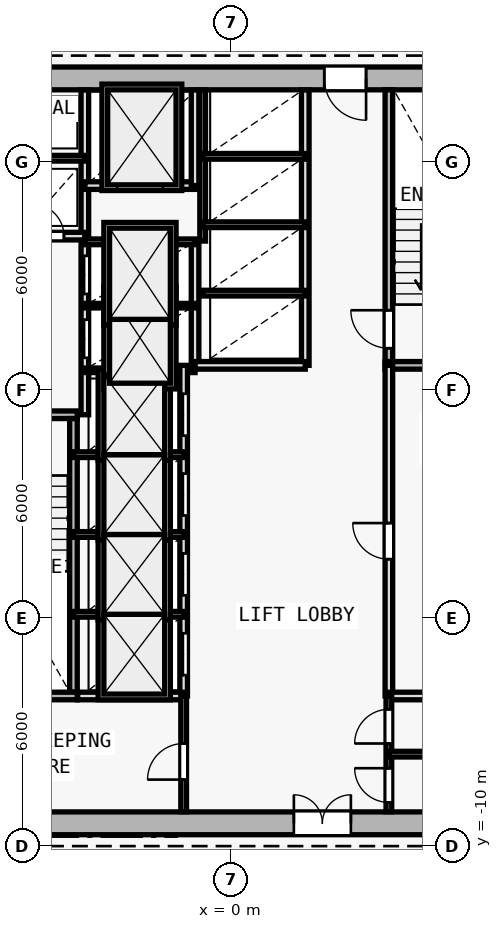
"""IFC4 building model, lengths in metres.
Left out: names, types, materials, properties, quantities, classifications, styles, units other than length and angle.
Written with IfcOpenShell. Run it as: python <this file> out.ifc"""

import sys

from ifc_helpers import new_model, si_unit, direction, frame, frame_2d, origin, origin_2d, place, context, subcontext, project, spatial, rectangle, i_section, extrude, element, fill, save


model = new_model("IFC4")
c1 = context("Model", 3, precision=1e-05, world=origin(), true_north=direction((0.0, 1.0)))
c2 = subcontext(c1, "Body", "Model", "MODEL_VIEW")
j1 = project(units=[si_unit("LENGTHUNIT", "METRE"), si_unit("PLANEANGLEUNIT", "RADIAN")], contexts=[c1])
p1 = place(None, origin())
s1 = spatial("IfcSite", under=j1, at=p1, CompositionType="ELEMENT")
p2 = place(p1, origin())
s2 = spatial("IfcBuilding", under=s1, at=p2, CompositionType="ELEMENT")
p3 = place(p2, frame((0.0, 0.0, 122.1)))
s3 = spatial("IfcBuildingStorey", under=s2, at=p3, CompositionType="ELEMENT", Elevation=122.1)
p4 = place(p3, frame((0.0, -9.4, 0.0), z_axis=(0.0, 0.0, 1.0), x_axis=(1.0, 0.0, 0.0)))
e1 = element("IfcColumn", 1, at=p4, inside=s3, PredefinedType="COLUMN", context=c2, shape_type="SweptSolid", body=[
    extrude(i_section(OverallWidth=0.409, OverallDepth=0.425, WebThickness=0.021, FlangeThickness=0.034, FilletRadius=0.015, at=origin_2d()), origin(), (0.0, 0.0, 1.0), 3.6),
])
p5 = place(p3, frame((-8.0, -9.4, 0.0), z_axis=(0.0, 0.0, 1.0), x_axis=(1.0, 0.0, 0.0)))
e2 = element("IfcWall", 2, at=p5, inside=s3, PredefinedType="SHEAR", context=c2, shape_type="SweptSolid", body=[
    extrude(rectangle(XDim=16.0, YDim=0.6, at=frame_2d((8.0, 0.0))), origin(), (0.0, 0.0, 1.0), 3.35),
])
p6 = place(p5, frame((9.65, 0.0, 0.0)))
e3 = element("IfcOpeningElement", 3, at=p6, cuts=e2, PredefinedType="OPENING", context=c2, shape_type="SweptSolid", body=[
    extrude(rectangle(XDim=1.5, YDim=2.2, at=frame_2d((0.75, 1.1))), frame((0.0, 0.31, 0.0), z_axis=(0.0, -1.0, 0.0), x_axis=(1.0, 0.0, 0.0)), (0.0, 0.0, 1.0), 0.62),
])
p7 = place(p3, frame((8.0, 10.2, 0.0), z_axis=(0.0, 0.0, 1.0), x_axis=(-1.0, 0.0, 0.0)))
e4 = element("IfcWall", 4, at=p7, inside=s3, PredefinedType="SHEAR", context=c2, shape_type="SweptSolid", body=[
    extrude(rectangle(XDim=16.0, YDim=0.6, at=frame_2d((8.0, 0.0))), origin(), (0.0, 0.0, 1.0), 3.35),
])
p8 = place(p7, frame((4.45, 0.0, 0.0)))
e5 = element("IfcOpeningElement", 5, at=p8, cuts=e4, PredefinedType="OPENING", context=c2, shape_type="SweptSolid", body=[
    extrude(rectangle(XDim=1.1, YDim=2.15, at=frame_2d((0.55, 1.075))), frame((0.0, 0.31, 0.0), z_axis=(0.0, -1.0, 0.0), x_axis=(1.0, 0.0, 0.0)), (0.0, 0.0, 1.0), 0.62),
])
p9 = place(p3, frame((-7.4, 1.35, 0.0), z_axis=(0.0, 0.0, 1.0), x_axis=(1.0, 0.0, 0.0)))
e6 = element("IfcWall", 6, at=p9, inside=s3, PredefinedType="SOLIDWALL", context=c2, shape_type="SweptSolid", body=[
    extrude(rectangle(XDim=3.35, YDim=0.2, at=frame_2d((1.675, 0.0))), origin(), (0.0, 0.0, 1.0), 3.35),
])
p10 = place(p9, frame((0.65, 0.0, 0.0)))
e7 = element("IfcOpeningElement", 7, at=p10, cuts=e6, PredefinedType="OPENING", context=c2, shape_type="SweptSolid", body=[
    extrude(rectangle(XDim=1.0, YDim=2.15, at=frame_2d((0.5, 1.075))), frame((0.0, 0.11, 0.0), z_axis=(0.0, -1.0, 0.0), x_axis=(1.0, 0.0, 0.0)), (0.0, 0.0, 1.0), 0.22),
])
p11 = place(p3, frame((-4.15, -5.95, 0.0), z_axis=(0.0, 0.0, 1.0), x_axis=(0.0, 1.0, 0.0)))
e8 = element("IfcWall", 8, at=p11, inside=s3, PredefinedType="SOLIDWALL", context=c2, shape_type="SweptSolid", body=[
    extrude(rectangle(XDim=7.2, YDim=0.2, at=frame_2d((3.6, 0.0))), origin(), (0.0, 0.0, 1.0), 3.35),
])
p12 = place(p3, frame((-3.85, 1.35, 0.0), z_axis=(0.0, 0.0, 1.0), x_axis=(0.0, 1.0, 0.0)))
e9 = element("IfcWall", 9, at=p12, inside=s3, PredefinedType="SOLIDWALL", context=c2, shape_type="SweptSolid", body=[
    extrude(rectangle(XDim=8.545, YDim=0.2, at=frame_2d((4.272, 0.0))), origin(), (0.0, 0.0, 1.0), 3.35),
])
p13 = place(p12, frame((1.5, 0.0, 0.0)))
e10 = element("IfcOpeningElement", 10, at=p13, cuts=e9, PredefinedType="OPENING", context=c2, shape_type="SweptSolid", body=[
    extrude(rectangle(XDim=1.0, YDim=2.15, at=frame_2d((0.5, 1.075))), frame((0.0, 0.11, 0.0), z_axis=(0.0, -1.0, 0.0), x_axis=(1.0, 0.0, 0.0)), (0.0, 0.0, 1.0), 0.22),
])
p14 = place(p12, frame((3.18, 0.0, 0.0)))
e11 = element("IfcOpeningElement", 11, at=p14, cuts=e9, PredefinedType="OPENING", context=c2, shape_type="SweptSolid", body=[
    extrude(rectangle(XDim=1.0, YDim=2.15, at=frame_2d((0.5, 1.075))), frame((0.0, 0.11, 0.0), z_axis=(0.0, -1.0, 0.0), x_axis=(1.0, 0.0, 0.0)), (0.0, 0.0, 1.0), 0.22),
])
p15 = place(p3, frame((-7.395, 6.05, 0.0), z_axis=(0.0, 0.0, 1.0), x_axis=(1.0, 0.0, 0.0)))
e12 = element("IfcWall", 12, at=p15, inside=s3, PredefinedType="SOLIDWALL", context=c2, shape_type="SweptSolid", body=[
    extrude(rectangle(XDim=3.545, YDim=0.2, at=frame_2d((1.772, 0.0))), origin(), (0.0, 0.0, 1.0), 3.35),
])
p16 = place(p15, frame((0.345, 0.0, 0.0)))
e13 = element("IfcOpeningElement", 13, at=p16, cuts=e12, PredefinedType="OPENING", context=c2, shape_type="SweptSolid", body=[
    extrude(rectangle(XDim=0.85, YDim=2.1, at=frame_2d((0.425, 1.05))), frame((0.0, 0.11, 0.0), z_axis=(0.0, -1.0, 0.0), x_axis=(1.0, 0.0, 0.0)), (0.0, 0.0, 1.0), 0.22),
])
p17 = place(p15, frame((2.145, 0.0, 0.0)))
e14 = element("IfcOpeningElement", 14, at=p17, cuts=e12, PredefinedType="OPENING", context=c2, shape_type="SweptSolid", body=[
    extrude(rectangle(XDim=0.85, YDim=2.1, at=frame_2d((0.425, 1.05))), frame((0.0, 0.11, 0.0), z_axis=(0.0, -1.0, 0.0), x_axis=(1.0, 0.0, 0.0)), (0.0, 0.0, 1.0), 0.22),
])
p18 = place(p3, frame((-7.395, 8.1, 0.0), z_axis=(0.0, 0.0, 1.0), x_axis=(1.0, 0.0, 0.0)))
e15 = element("IfcWall", 15, at=p18, inside=s3, PredefinedType="PARTITIONING", context=c2, shape_type="SweptSolid", body=[
    extrude(rectangle(XDim=3.545, YDim=0.15, at=frame_2d((1.772, 0.0))), origin(), (0.0, 0.0, 1.0), 3.35),
])
p19 = place(p3, frame((4.15, 2.75, 0.0), z_axis=(0.0, 0.0, 1.0), x_axis=(0.0, 1.0, 0.0)))
e16 = element("IfcWall", 16, at=p19, inside=s3, PredefinedType="SOLIDWALL", context=c2, shape_type="SweptSolid", body=[
    extrude(rectangle(XDim=7.15, YDim=0.2, at=frame_2d((3.575, 0.0))), origin(), (0.0, 0.0, 1.0), 3.35),
])
p20 = place(p19, frame((0.35, 0.0, 0.0)))
e17 = element("IfcOpeningElement", 17, at=p20, cuts=e16, PredefinedType="OPENING", context=c2, shape_type="SweptSolid", body=[
    extrude(rectangle(XDim=1.0, YDim=2.15, at=frame_2d((0.5, 1.075))), frame((0.0, 0.11, 0.0), z_axis=(0.0, -1.0, 0.0), x_axis=(1.0, 0.0, 0.0)), (0.0, 0.0, 1.0), 0.22),
])
p21 = place(p3, frame((4.05, 2.65, 0.0), z_axis=(0.0, 0.0, 1.0), x_axis=(1.0, 0.0, 0.0)))
e18 = element("IfcWall", 18, at=p21, inside=s3, PredefinedType="SOLIDWALL", context=c2, shape_type="SweptSolid", body=[
    extrude(rectangle(XDim=3.35, YDim=0.2, at=frame_2d((1.675, 0.0))), origin(), (0.0, 0.0, 1.0), 3.35),
])
p22 = place(p3, frame((-0.95, 2.65, 0.0), z_axis=(0.0, 0.0, 1.0), x_axis=(0.0, 1.0, 0.0)))
e19 = element("IfcWall", 19, at=p22, inside=s3, PredefinedType="SOLIDWALL", context=c2, shape_type="SweptSolid", body=[
    extrude(rectangle(XDim=3.27, YDim=0.2, at=frame_2d((1.635, 0.0))), origin(), (0.0, 0.0, 1.0), 3.35),
])
for number, where, z_axis, x_axis in (
    (20, (-3.85, 2.52, 0.0), (0.0, 0.0, 1.0), (1.0, 0.0, 0.0)),
    (21, (-3.85, 4.22, 0.0), (0.0, 0.0, 1.0), (1.0, 0.0, 0.0)),
):
    element("IfcWall", number, at=place(p3, frame(where, z_axis=z_axis, x_axis=x_axis)), inside=s3, PredefinedType="PARTITIONING", context=c2, shape_type="SweptSolid", body=[
        extrude(rectangle(XDim=2.9, YDim=0.12, at=frame_2d((1.45, 0.0))), origin(), (0.0, 0.0, 1.0), 3.35),
    ])
p23 = place(p3, frame((-3.85, 5.9, 0.0), z_axis=(0.0, 0.0, 1.0), x_axis=(1.0, 0.0, 0.0)))
e22 = element("IfcWall", 22, at=p23, inside=s3, PredefinedType="PARTITIONING", context=c2, shape_type="SweptSolid", body=[
    extrude(rectangle(XDim=2.9, YDim=0.15, at=frame_2d((1.45, 0.0))), origin(), (0.0, 0.0, 1.0), 3.35),
])
p24 = place(p3, frame((-3.85, 7.38, 0.0), z_axis=(0.0, 0.0, 1.0), x_axis=(1.0, 0.0, 0.0)))
e23 = element("IfcWall", 23, at=p24, inside=s3, PredefinedType="SOLIDWALL", context=c2, shape_type="SweptSolid", body=[
    extrude(rectangle(XDim=2.9, YDim=0.2, at=frame_2d((1.45, 0.0))), origin(), (0.0, 0.0, 1.0), 3.35),
])
p25 = place(p24, frame((0.85, 0.0, 0.0)))
e24 = element("IfcOpeningElement", 24, at=p25, cuts=e23, PredefinedType="OPENING", context=c2, shape_type="SweptSolid", body=[
    extrude(rectangle(XDim=1.2, YDim=2.2, at=frame_2d((0.6, 1.1))), frame((0.0, 0.11, 0.0), z_axis=(0.0, -1.0, 0.0), x_axis=(1.0, 0.0, 0.0)), (0.0, 0.0, 1.0), 0.22),
])
p26 = place(p3, frame((-0.95, 7.38, 0.0), z_axis=(0.0, 0.0, 1.0), x_axis=(0.0, 1.0, 0.0)))
e25 = element("IfcWall", 25, at=p26, inside=s3, PredefinedType="SOLIDWALL", context=c2, shape_type="SweptSolid", body=[
    extrude(rectangle(XDim=2.515, YDim=0.2, at=frame_2d((1.258, 0.0))), origin(), (0.0, 0.0, 1.0), 3.35),
])
p27 = place(p3, frame((4.15, -6.05, 0.0), z_axis=(0.0, 0.0, 1.0), x_axis=(0.0, 1.0, 0.0)))
e26 = element("IfcWall", 26, at=p27, inside=s3, PredefinedType="SOLIDWALL", context=c2, shape_type="SweptSolid", body=[
    extrude(rectangle(XDim=8.7, YDim=0.2, at=frame_2d((4.35, 0.0))), origin(), (0.0, 0.0, 1.0), 3.35),
])
p28 = place(p27, frame((3.6, 0.0, 0.0)))
e27 = element("IfcOpeningElement", 27, at=p28, cuts=e26, PredefinedType="OPENING", context=c2, shape_type="SweptSolid", body=[
    extrude(rectangle(XDim=0.95, YDim=2.1, at=frame_2d((0.475, 1.05))), frame((0.0, 0.11, 0.0), z_axis=(0.0, -1.0, 0.0), x_axis=(1.0, 0.0, 0.0)), (0.0, 0.0, 1.0), 0.22),
])
p29 = place(p3, frame((-1.25, -6.05, 0.0), z_axis=(0.0, 0.0, 1.0), x_axis=(0.0, 1.0, 0.0)))
e28 = element("IfcWall", 28, at=p29, inside=s3, PredefinedType="SOLIDWALL", context=c2, shape_type="SweptSolid", body=[
    extrude(rectangle(XDim=8.7, YDim=0.2, at=frame_2d((4.35, 0.0))), origin(), (0.0, 0.0, 1.0), 3.35),
])
p30 = place(p29, frame((0.55, 0.0, 0.0)))
e29 = element("IfcOpeningElement", 29, at=p30, cuts=e28, PredefinedType="OPENING", context=c2, shape_type="SweptSolid", body=[
    extrude(rectangle(XDim=1.1, YDim=2.15, at=frame_2d((0.55, 1.075))), frame((0.0, 0.11, 0.0), z_axis=(0.0, -1.0, 0.0), x_axis=(1.0, 0.0, 0.0)), (0.0, 0.0, 1.0), 0.22),
])
p31 = place(p29, frame((2.65, 0.0, 0.0)))
e30 = element("IfcOpeningElement", 30, at=p31, cuts=e28, PredefinedType="OPENING", context=c2, shape_type="SweptSolid", body=[
    extrude(rectangle(XDim=1.1, YDim=2.15, at=frame_2d((0.55, 1.075))), frame((0.0, 0.11, 0.0), z_axis=(0.0, -1.0, 0.0), x_axis=(1.0, 0.0, 0.0)), (0.0, 0.0, 1.0), 0.22),
])
p32 = place(p29, frame((4.75, 0.0, 0.0)))
e31 = element("IfcOpeningElement", 31, at=p32, cuts=e28, PredefinedType="OPENING", context=c2, shape_type="SweptSolid", body=[
    extrude(rectangle(XDim=1.1, YDim=2.15, at=frame_2d((0.55, 1.075))), frame((0.0, 0.11, 0.0), z_axis=(0.0, -1.0, 0.0), x_axis=(1.0, 0.0, 0.0)), (0.0, 0.0, 1.0), 0.22),
])
p33 = place(p29, frame((6.85, 0.0, 0.0)))
e32 = element("IfcOpeningElement", 32, at=p33, cuts=e28, PredefinedType="OPENING", context=c2, shape_type="SweptSolid", body=[
    extrude(rectangle(XDim=1.1, YDim=2.15, at=frame_2d((0.55, 1.075))), frame((0.0, 0.11, 0.0), z_axis=(0.0, -1.0, 0.0), x_axis=(1.0, 0.0, 0.0)), (0.0, 0.0, 1.0), 0.22),
])
for number, where, z_axis, x_axis in (
    (33, (-4.15, -3.9, 0.0), (0.0, 0.0, 1.0), (1.0, 0.0, 0.0)),
    (34, (-4.15, -1.8, 0.0), (0.0, 0.0, 1.0), (1.0, 0.0, 0.0)),
    (35, (-4.15, 0.3, 0.0), (0.0, 0.0, 1.0), (1.0, 0.0, 0.0)),
):
    element("IfcWall", number, at=place(p3, frame(where, z_axis=z_axis, x_axis=x_axis)), inside=s3, PredefinedType="PARTITIONING", context=c2, shape_type="SweptSolid", body=[
        extrude(rectangle(XDim=2.9, YDim=0.15, at=frame_2d((1.45, 0.0))), origin(), (0.0, 0.0, 1.0), 3.35),
    ])
p34 = place(p3, frame((1.95, 2.65, 0.0), z_axis=(0.0, 0.0, 1.0), x_axis=(0.0, 1.0, 0.0)))
e36 = element("IfcWall", 36, at=p34, inside=s3, PredefinedType="SOLIDWALL", context=c2, shape_type="SweptSolid", body=[
    extrude(rectangle(XDim=7.245, YDim=0.2, at=frame_2d((3.623, 0.0))), origin(), (0.0, 0.0, 1.0), 3.35),
])
p35 = place(p3, frame((-0.95, 2.65, 0.0), z_axis=(0.0, 0.0, 1.0), x_axis=(1.0, 0.0, 0.0)))
e37 = element("IfcWall", 37, at=p35, inside=s3, PredefinedType="SOLIDWALL", context=c2, shape_type="SweptSolid", body=[
    extrude(rectangle(XDim=2.9, YDim=0.2, at=frame_2d((1.45, 0.0))), origin(), (0.0, 0.0, 1.0), 3.35),
])
p36 = place(p3, frame((-0.75, 5.92, 0.0), z_axis=(0.0, 0.0, 1.0), x_axis=(0.0, 1.0, 0.0)))
e38 = element("IfcWall", 38, at=p36, inside=s3, PredefinedType="PARTITIONING", context=c2, shape_type="SweptSolid", body=[
    extrude(rectangle(XDim=3.975, YDim=0.15, at=frame_2d((1.988, 0.0))), origin(), (0.0, 0.0, 1.0), 3.35),
])
for number, where, z_axis, x_axis in (
    (39, (-0.75, 4.55, 0.0), (0.0, 0.0, 1.0), (1.0, 0.0, 0.0)),
    (40, (-0.75, 6.35, 0.0), (0.0, 0.0, 1.0), (1.0, 0.0, 0.0)),
    (41, (-0.75, 8.15, 0.0), (0.0, 0.0, 1.0), (1.0, 0.0, 0.0)),
):
    element("IfcWall", number, at=place(p3, frame(where, z_axis=z_axis, x_axis=x_axis)), inside=s3, PredefinedType="PARTITIONING", context=c2, shape_type="SweptSolid", body=[
        extrude(rectangle(XDim=2.7, YDim=0.15, at=frame_2d((1.35, 0.0))), origin(), (0.0, 0.0, 1.0), 3.35),
    ])
p37 = place(p3, frame((-7.4, -6.05, 0.0), z_axis=(0.0, 0.0, 1.0), x_axis=(1.0, 0.0, 0.0)))
e42 = element("IfcWall", 42, at=p37, inside=s3, PredefinedType="SOLIDWALL", context=c2, shape_type="SweptSolid", body=[
    extrude(rectangle(XDim=3.35, YDim=0.2, at=frame_2d((1.675, 0.0))), origin(), (0.0, 0.0, 1.0), 3.35),
])
p38 = place(p3, frame((-4.04, -6.05, 0.0), z_axis=(0.0, 0.0, 1.0), x_axis=(1.0, 0.0, 0.0)))
e43 = element("IfcWall", 43, at=p38, inside=s3, PredefinedType="SOLIDWALL", context=c2, shape_type="SweptSolid", body=[
    extrude(rectangle(XDim=2.79, YDim=0.2, at=frame_2d((1.395, 0.0))), origin(), (0.0, 0.0, 1.0), 3.35),
])
p39 = place(p3, frame((4.15, -6.05, 0.0), z_axis=(0.0, 0.0, 1.0), x_axis=(1.0, 0.0, 0.0)))
e44 = element("IfcWall", 44, at=p39, inside=s3, PredefinedType="SOLIDWALL", context=c2, shape_type="SweptSolid", body=[
    extrude(rectangle(XDim=3.245, YDim=0.2, at=frame_2d((1.623, 0.0))), origin(), (0.0, 0.0, 1.0), 3.35),
])
p40 = place(p3, frame((-1.25, -9.095, 0.0), z_axis=(0.0, 0.0, 1.0), x_axis=(0.0, 1.0, 0.0)))
e45 = element("IfcWall", 45, at=p40, inside=s3, PredefinedType="PARTITIONING", context=c2, shape_type="SweptSolid", body=[
    extrude(rectangle(XDim=3.045, YDim=0.15, at=frame_2d((1.522, 0.0))), origin(), (0.0, 0.0, 1.0), 3.35),
])
p41 = place(p40, frame((0.845, 0.0, 0.0)))
e46 = element("IfcOpeningElement", 46, at=p41, cuts=e45, PredefinedType="OPENING", context=c2, shape_type="SweptSolid", body=[
    extrude(rectangle(XDim=0.95, YDim=2.1, at=frame_2d((0.475, 1.05))), frame((0.0, 0.085, 0.0), z_axis=(0.0, -1.0, 0.0), x_axis=(1.0, 0.0, 0.0)), (0.0, 0.0, 1.0), 0.17),
])
p42 = place(p3, frame((4.15, -9.095, 0.0), z_axis=(0.0, 0.0, 1.0), x_axis=(0.0, 1.0, 0.0)))
e47 = element("IfcWall", 47, at=p42, inside=s3, PredefinedType="PARTITIONING", context=c2, shape_type="SweptSolid", body=[
    extrude(rectangle(XDim=3.045, YDim=0.15, at=frame_2d((1.522, 0.0))), origin(), (0.0, 0.0, 1.0), 3.35),
])
p43 = place(p42, frame((0.245, 0.0, 0.0)))
e48 = element("IfcOpeningElement", 48, at=p43, cuts=e47, PredefinedType="OPENING", context=c2, shape_type="SweptSolid", body=[
    extrude(rectangle(XDim=0.9, YDim=2.1, at=frame_2d((0.45, 1.05))), frame((0.0, 0.085, 0.0), z_axis=(0.0, -1.0, 0.0), x_axis=(1.0, 0.0, 0.0)), (0.0, 0.0, 1.0), 0.17),
])
p44 = place(p42, frame((1.795, 0.0, 0.0)))
e49 = element("IfcOpeningElement", 49, at=p44, cuts=e47, PredefinedType="OPENING", context=c2, shape_type="SweptSolid", body=[
    extrude(rectangle(XDim=0.9, YDim=2.1, at=frame_2d((0.45, 1.05))), frame((0.0, 0.085, 0.0), z_axis=(0.0, -1.0, 0.0), x_axis=(1.0, 0.0, 0.0)), (0.0, 0.0, 1.0), 0.17),
])
p45 = place(p3, frame((4.15, -7.58, 0.0), z_axis=(0.0, 0.0, 1.0), x_axis=(1.0, 0.0, 0.0)))
e50 = element("IfcWall", 50, at=p45, inside=s3, PredefinedType="PARTITIONING", context=c2, shape_type="SweptSolid", body=[
    extrude(rectangle(XDim=3.245, YDim=0.15, at=frame_2d((1.623, 0.0))), origin(), (0.0, 0.0, 1.0), 3.35),
])
p46 = place(p6, origin())
e51 = element("IfcDoor", 51, at=p46, inside=s3, OperationType="DOUBLE_DOOR_SINGLE_SWING", PredefinedType="DOOR", context=c2, shape_type="SweptSolid", body=[
    extrude(rectangle(XDim=1.5, YDim=2.2, at=frame_2d((0.75, 1.1))), frame((0.0, 0.025, 0.0), z_axis=(0.0, -1.0, 0.0), x_axis=(1.0, 0.0, 0.0)), (0.0, 0.0, 1.0), 0.05),
])
fill(e3, e51)
p47 = place(p8, origin())
e52 = element("IfcDoor", 52, at=p47, inside=s3, OperationType="SINGLE_SWING_LEFT", PredefinedType="DOOR", context=c2, shape_type="SweptSolid", body=[
    extrude(rectangle(XDim=1.1, YDim=2.15, at=frame_2d((0.55, 1.075))), frame((0.0, 0.025, 0.0), z_axis=(0.0, -1.0, 0.0), x_axis=(1.0, 0.0, 0.0)), (0.0, 0.0, 1.0), 0.05),
])
fill(e5, e52)
p48 = place(p17, origin())
e53 = element("IfcDoor", 53, at=p48, inside=s3, OperationType="SINGLE_SWING_LEFT", PredefinedType="DOOR", context=c2, shape_type="SweptSolid", body=[
    extrude(rectangle(XDim=0.85, YDim=2.1, at=frame_2d((0.425, 1.05))), frame((0.0, 0.025, 0.0), z_axis=(0.0, -1.0, 0.0), x_axis=(1.0, 0.0, 0.0)), (0.0, 0.0, 1.0), 0.05),
])
fill(e14, e53)
p49 = place(p20, origin())
e54 = element("IfcDoor", 54, at=p49, inside=s3, OperationType="SINGLE_SWING_RIGHT", PredefinedType="DOOR", context=c2, shape_type="SweptSolid", body=[
    extrude(rectangle(XDim=1.0, YDim=2.15, at=frame_2d((0.5, 1.075))), frame((0.0, 0.025, 0.0), z_axis=(0.0, -1.0, 0.0), x_axis=(1.0, 0.0, 0.0)), (0.0, 0.0, 1.0), 0.05),
])
fill(e17, e54)
p50 = place(p25, origin())
e55 = element("IfcDoor", 55, at=p50, inside=s3, OperationType="DOUBLE_DOOR_SLIDING", PredefinedType="DOOR", context=c2, shape_type="SweptSolid", body=[
    extrude(rectangle(XDim=1.2, YDim=2.2, at=frame_2d((0.6, 1.1))), frame((0.0, 0.025, 0.0), z_axis=(0.0, -1.0, 0.0), x_axis=(1.0, 0.0, 0.0)), (0.0, 0.0, 1.0), 0.05),
])
fill(e24, e55)
p51 = place(p28, origin())
e56 = element("IfcDoor", 56, at=p51, inside=s3, OperationType="SINGLE_SWING_RIGHT", PredefinedType="DOOR", context=c2, shape_type="SweptSolid", body=[
    extrude(rectangle(XDim=0.95, YDim=2.1, at=frame_2d((0.475, 1.05))), frame((0.0, 0.025, 0.0), z_axis=(0.0, -1.0, 0.0), x_axis=(1.0, 0.0, 0.0)), (0.0, 0.0, 1.0), 0.05),
])
fill(e27, e56)
p52 = place(p30, origin())
e57 = element("IfcDoor", 57, at=p52, inside=s3, OperationType="DOUBLE_DOOR_SLIDING", PredefinedType="DOOR", context=c2, shape_type="SweptSolid", body=[
    extrude(rectangle(XDim=1.1, YDim=2.15, at=frame_2d((0.55, 1.075))), frame((0.0, 0.025, 0.0), z_axis=(0.0, -1.0, 0.0), x_axis=(1.0, 0.0, 0.0)), (0.0, 0.0, 1.0), 0.05),
])
fill(e29, e57)
p53 = place(p31, origin())
e58 = element("IfcDoor", 58, at=p53, inside=s3, OperationType="DOUBLE_DOOR_SLIDING", PredefinedType="DOOR", context=c2, shape_type="SweptSolid", body=[
    extrude(rectangle(XDim=1.1, YDim=2.15, at=frame_2d((0.55, 1.075))), frame((0.0, 0.025, 0.0), z_axis=(0.0, -1.0, 0.0), x_axis=(1.0, 0.0, 0.0)), (0.0, 0.0, 1.0), 0.05),
])
fill(e30, e58)
p54 = place(p32, origin())
e59 = element("IfcDoor", 59, at=p54, inside=s3, OperationType="DOUBLE_DOOR_SLIDING", PredefinedType="DOOR", context=c2, shape_type="SweptSolid", body=[
    extrude(rectangle(XDim=1.1, YDim=2.15, at=frame_2d((0.55, 1.075))), frame((0.0, 0.025, 0.0), z_axis=(0.0, -1.0, 0.0), x_axis=(1.0, 0.0, 0.0)), (0.0, 0.0, 1.0), 0.05),
])
fill(e31, e59)
p55 = place(p33, origin())
e60 = element("IfcDoor", 60, at=p55, inside=s3, OperationType="DOUBLE_DOOR_SLIDING", PredefinedType="DOOR", context=c2, shape_type="SweptSolid", body=[
    extrude(rectangle(XDim=1.1, YDim=2.15, at=frame_2d((0.55, 1.075))), frame((0.0, 0.025, 0.0), z_axis=(0.0, -1.0, 0.0), x_axis=(1.0, 0.0, 0.0)), (0.0, 0.0, 1.0), 0.05),
])
fill(e32, e60)
p56 = place(p13, origin())
e61 = element("IfcDoor", 61, at=p56, inside=s3, OperationType="DOUBLE_DOOR_SLIDING", PredefinedType="DOOR", context=c2, shape_type="SweptSolid", body=[
    extrude(rectangle(XDim=1.0, YDim=2.15, at=frame_2d((0.5, 1.075))), frame((0.0, 0.025, 0.0), z_axis=(0.0, -1.0, 0.0), x_axis=(1.0, 0.0, 0.0)), (0.0, 0.0, 1.0), 0.05),
])
fill(e10, e61)
p57 = place(p14, origin())
e62 = element("IfcDoor", 62, at=p57, inside=s3, OperationType="DOUBLE_DOOR_SLIDING", PredefinedType="DOOR", context=c2, shape_type="SweptSolid", body=[
    extrude(rectangle(XDim=1.0, YDim=2.15, at=frame_2d((0.5, 1.075))), frame((0.0, 0.025, 0.0), z_axis=(0.0, -1.0, 0.0), x_axis=(1.0, 0.0, 0.0)), (0.0, 0.0, 1.0), 0.05),
])
fill(e11, e62)
p58 = place(p41, origin())
e63 = element("IfcDoor", 63, at=p58, inside=s3, OperationType="SINGLE_SWING_LEFT", PredefinedType="DOOR", context=c2, shape_type="SweptSolid", body=[
    extrude(rectangle(XDim=0.95, YDim=2.1, at=frame_2d((0.475, 1.05))), frame((0.0, 0.025, 0.0), z_axis=(0.0, -1.0, 0.0), x_axis=(1.0, 0.0, 0.0)), (0.0, 0.0, 1.0), 0.05),
])
fill(e46, e63)
p59 = place(p43, origin())
e64 = element("IfcDoor", 64, at=p59, inside=s3, OperationType="SINGLE_SWING_RIGHT", PredefinedType="DOOR", context=c2, shape_type="SweptSolid", body=[
    extrude(rectangle(XDim=0.9, YDim=2.1, at=frame_2d((0.45, 1.05))), frame((0.0, 0.025, 0.0), z_axis=(0.0, -1.0, 0.0), x_axis=(1.0, 0.0, 0.0)), (0.0, 0.0, 1.0), 0.05),
])
fill(e48, e64)
p60 = place(p44, origin())
e65 = element("IfcDoor", 65, at=p60, inside=s3, OperationType="SINGLE_SWING_LEFT", PredefinedType="DOOR", context=c2, shape_type="SweptSolid", body=[
    extrude(rectangle(XDim=0.9, YDim=2.1, at=frame_2d((0.45, 1.05))), frame((0.0, 0.025, 0.0), z_axis=(0.0, -1.0, 0.0), x_axis=(1.0, 0.0, 0.0)), (0.0, 0.0, 1.0), 0.05),
])
fill(e49, e65)
save(model, sys.argv[1])
